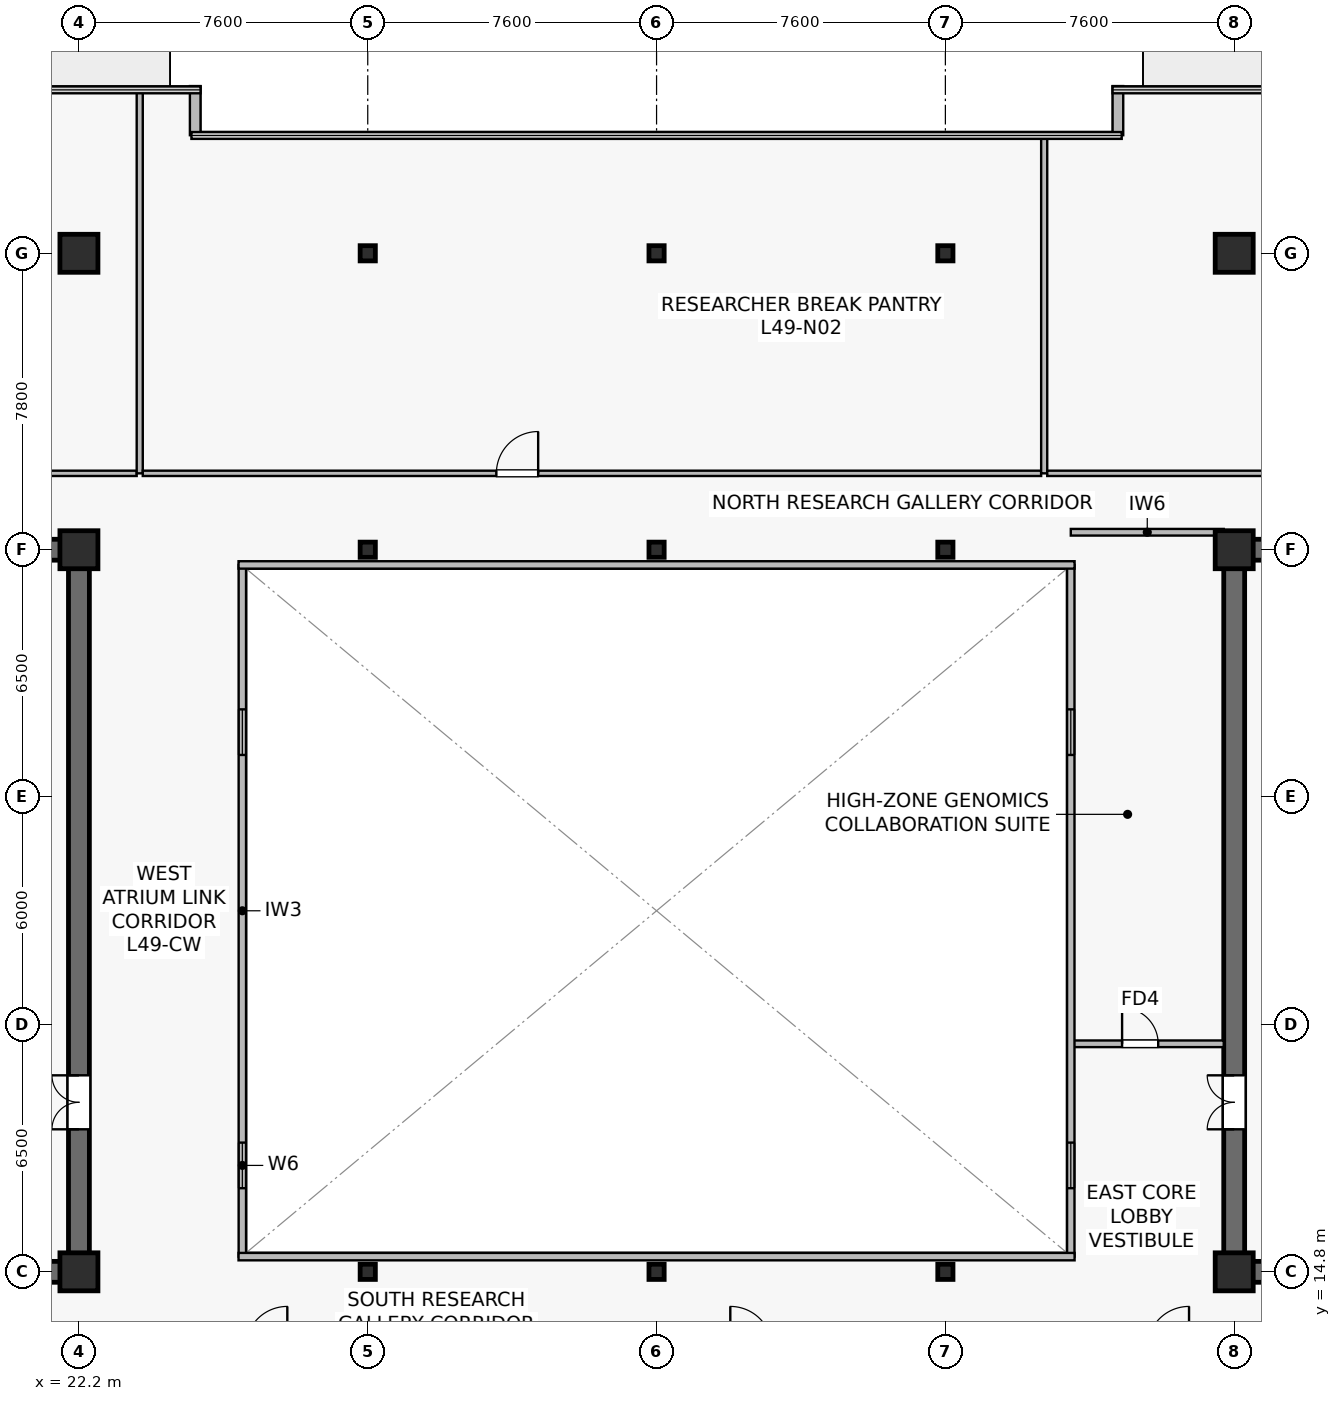
"""IFC4 building model, lengths in metres.
Left out: names, types, materials, properties, quantities, classifications, styles, units other than length and angle.
Written with IfcOpenShell. Run it as: python <this file> out.ifc"""

import sys

from ifc_helpers import new_model, si_unit, direction, frame, frame_2d, origin, origin_2d, place, context, subcontext, project, spatial, rectangle, hollow_rectangle, extrude, source, transform, mapped, element, fill, save


model = new_model("IFC4")
c1 = context("Model", 3, precision=1e-05, world=origin(), true_north=direction((0.0, 1.0)))
c2 = subcontext(c1, "Body", "Model", "MODEL_VIEW")
j1 = project(units=[si_unit("LENGTHUNIT", "METRE"), si_unit("PLANEANGLEUNIT", "RADIAN")], contexts=[c1])
p1 = place(None, origin())
s1 = spatial("IfcSite", under=j1, at=p1, CompositionType="ELEMENT")
p2 = place(p1, origin())
s2 = spatial("IfcBuilding", under=s1, at=p2, CompositionType="ELEMENT")
p3 = place(p2, frame((0.0, 0.0, 205.5)))
s3 = spatial("IfcBuildingStorey", under=s2, at=p3, CompositionType="ELEMENT", Elevation=205.5)
p4 = place(p3, frame((7.125, 14.8, 0.0), z_axis=(0.0, 0.0, 1.0), x_axis=(1.0, 0.0, 0.0)))
e1 = element("IfcWall", 1, at=p4, inside=s3, PredefinedType="SHEAR", context=c2, shape_type="SweptSolid", body=[
    extrude(rectangle(XDim=15.35, YDim=0.55, at=frame_2d((7.675, 0.0))), origin(), (0.0, 0.0, 1.0), 3.8),
])
p5 = place(p3, frame((7.125, 33.8, 0.0), z_axis=(0.0, 0.0, 1.0), x_axis=(1.0, 0.0, 0.0)))
e2 = element("IfcWall", 2, at=p5, inside=s3, PredefinedType="SHEAR", context=c2, shape_type="SweptSolid", body=[
    extrude(rectangle(XDim=15.35, YDim=0.55, at=frame_2d((7.675, 0.0))), origin(), (0.0, 0.0, 1.0), 3.8),
])
p6 = place(p5, frame((5.625, 0.0, 0.0)))
e3 = element("IfcOpeningElement", 3, at=p6, cuts=e2, PredefinedType="OPENING", context=c2, shape_type="SweptSolid", body=[
    extrude(rectangle(XDim=0.95, YDim=2.15, at=frame_2d((0.475, 1.075))), frame((0.0, 0.285, 0.0), z_axis=(0.0, -1.0, 0.0), x_axis=(1.0, 0.0, 0.0)), (0.0, 0.0, 1.0), 0.57),
])
p7 = place(p5, frame((8.99, 0.0, 0.0)))
e4 = element("IfcOpeningElement", 4, at=p7, cuts=e2, PredefinedType="OPENING", context=c2, shape_type="SweptSolid", body=[
    extrude(rectangle(XDim=0.95, YDim=2.15, at=frame_2d((0.475, 1.075))), frame((0.0, 0.285, 0.0), z_axis=(0.0, -1.0, 0.0), x_axis=(1.0, 0.0, 0.0)), (0.0, 0.0, 1.0), 0.57),
])
p8 = place(p5, frame((12.39, 0.0, 0.0)))
e5 = element("IfcOpeningElement", 5, at=p8, cuts=e2, PredefinedType="OPENING", context=c2, shape_type="SweptSolid", body=[
    extrude(rectangle(XDim=0.95, YDim=2.15, at=frame_2d((0.475, 1.075))), frame((0.0, 0.285, 0.0), z_axis=(0.0, -1.0, 0.0), x_axis=(1.0, 0.0, 0.0)), (0.0, 0.0, 1.0), 0.57),
])
p9 = place(p3, frame((22.2, 15.075, 0.0), z_axis=(0.0, 0.0, 1.0), x_axis=(0.0, 1.0, 0.0)))
e6 = element("IfcWall", 6, at=p9, inside=s3, PredefinedType="SHEAR", context=c2, shape_type="SweptSolid", body=[
    extrude(rectangle(XDim=18.45, YDim=0.55, at=frame_2d((9.225, 0.0))), origin(), (0.0, 0.0, 1.0), 3.8),
])
p10 = place(p9, frame((3.475, 0.0, 0.0)))
e7 = element("IfcOpeningElement", 7, at=p10, cuts=e6, PredefinedType="OPENING", context=c2, shape_type="SweptSolid", body=[
    extrude(rectangle(XDim=1.42, YDim=2.2, at=frame_2d((0.71, 1.1))), frame((0.0, 0.285, 0.0), z_axis=(0.0, -1.0, 0.0), x_axis=(1.0, 0.0, 0.0)), (0.0, 0.0, 1.0), 0.57),
])
p11 = place(p3, frame((52.325, 14.8, 0.0), z_axis=(0.0, 0.0, 1.0), x_axis=(1.0, 0.0, 0.0)))
e8 = element("IfcWall", 8, at=p11, inside=s3, PredefinedType="SHEAR", context=c2, shape_type="SweptSolid", body=[
    extrude(rectangle(XDim=15.35, YDim=0.55, at=frame_2d((7.675, 0.0))), origin(), (0.0, 0.0, 1.0), 3.8),
])
p12 = place(p3, frame((52.325, 33.8, 0.0), z_axis=(0.0, 0.0, 1.0), x_axis=(1.0, 0.0, 0.0)))
e9 = element("IfcWall", 9, at=p12, inside=s3, PredefinedType="SHEAR", context=c2, shape_type="SweptSolid", body=[
    extrude(rectangle(XDim=15.35, YDim=0.55, at=frame_2d((7.675, 0.0))), origin(), (0.0, 0.0, 1.0), 3.8),
])
p13 = place(p12, frame((8.775, 0.0, 0.0)))
e10 = element("IfcOpeningElement", 10, at=p13, cuts=e9, PredefinedType="OPENING", context=c2, shape_type="SweptSolid", body=[
    extrude(rectangle(XDim=0.95, YDim=2.15, at=frame_2d((0.475, 1.075))), frame((0.0, 0.285, 0.0), z_axis=(0.0, -1.0, 0.0), x_axis=(1.0, 0.0, 0.0)), (0.0, 0.0, 1.0), 0.57),
])
p14 = place(p12, frame((5.41, 0.0, 0.0)))
e11 = element("IfcOpeningElement", 11, at=p14, cuts=e9, PredefinedType="OPENING", context=c2, shape_type="SweptSolid", body=[
    extrude(rectangle(XDim=0.95, YDim=2.15, at=frame_2d((0.475, 1.075))), frame((0.0, 0.285, 0.0), z_axis=(0.0, -1.0, 0.0), x_axis=(1.0, 0.0, 0.0)), (0.0, 0.0, 1.0), 0.57),
])
p15 = place(p12, frame((2.01, 0.0, 0.0)))
e12 = element("IfcOpeningElement", 12, at=p15, cuts=e9, PredefinedType="OPENING", context=c2, shape_type="SweptSolid", body=[
    extrude(rectangle(XDim=0.95, YDim=2.15, at=frame_2d((0.475, 1.075))), frame((0.0, 0.285, 0.0), z_axis=(0.0, -1.0, 0.0), x_axis=(1.0, 0.0, 0.0)), (0.0, 0.0, 1.0), 0.57),
])
p16 = place(p3, frame((52.6, 15.075, 0.0), z_axis=(0.0, 0.0, 1.0), x_axis=(0.0, 1.0, 0.0)))
e13 = element("IfcWall", 13, at=p16, inside=s3, PredefinedType="SHEAR", context=c2, shape_type="SweptSolid", body=[
    extrude(rectangle(XDim=18.45, YDim=0.55, at=frame_2d((9.225, 0.0))), origin(), (0.0, 0.0, 1.0), 3.8),
])
p17 = place(p16, frame((3.475, 0.0, 0.0)))
e14 = element("IfcOpeningElement", 14, at=p17, cuts=e13, PredefinedType="OPENING", context=c2, shape_type="SweptSolid", body=[
    extrude(rectangle(XDim=1.42, YDim=2.2, at=frame_2d((0.71, 1.1))), frame((0.0, 0.285, 0.0), z_axis=(0.0, -1.0, 0.0), x_axis=(1.0, 0.0, 0.0)), (0.0, 0.0, 1.0), 0.57),
])
m1 = source(origin(), c2, "Body", "SweptSolid", [
    extrude(rectangle(XDim=1.0, YDim=1.0, at=origin_2d()), origin(), (0.0, 0.0, 1.0), 4.1),
])
for number, where, z_axis, x_axis in (
    (15, (22.2, 14.8, 0.0), (0.0, 0.0, 1.0), (1.0, 0.0, 0.0)),
    (16, (22.2, 33.8, 0.0), (0.0, 0.0, 1.0), (1.0, 0.0, 0.0)),
    (17, (22.2, 41.6, 0.0), (0.0, 0.0, 1.0), (1.0, 0.0, 0.0)),
    (18, (52.6, 14.8, 0.0), (0.0, 0.0, 1.0), (1.0, 0.0, 0.0)),
    (19, (52.6, 33.8, 0.0), (0.0, 0.0, 1.0), (1.0, 0.0, 0.0)),
    (20, (52.6, 41.6, 0.0), (0.0, 0.0, 1.0), (1.0, 0.0, 0.0)),
):
    element("IfcColumn", number, at=place(p3, frame(where, z_axis=z_axis, x_axis=x_axis)), inside=s3, PredefinedType="COLUMN", context=c2, shape_type="MappedRepresentation", body=[
        mapped(m1, transform((0.0, 0.0, 0.0), scale=1.0)),
    ])
m2 = source(origin(), c2, "Body", "SweptSolid", [
    extrude(hollow_rectangle(XDim=0.4, YDim=0.4, WallThickness=0.019, at=origin_2d()), origin(), (0.0, 0.0, 1.0), 4.1),
])
for number, where, z_axis, x_axis in (
    (21, (29.8, 14.8, 0.0), (0.0, 0.0, 1.0), (1.0, 0.0, 0.0)),
    (22, (29.8, 33.8, 0.0), (0.0, 0.0, 1.0), (1.0, 0.0, 0.0)),
    (23, (29.8, 41.6, 0.0), (0.0, 0.0, 1.0), (1.0, 0.0, 0.0)),
    (24, (37.4, 14.8, 0.0), (0.0, 0.0, 1.0), (1.0, 0.0, 0.0)),
    (25, (37.4, 33.8, 0.0), (0.0, 0.0, 1.0), (1.0, 0.0, 0.0)),
    (26, (37.4, 41.6, 0.0), (0.0, 0.0, 1.0), (1.0, 0.0, 0.0)),
    (27, (45.0, 14.8, 0.0), (0.0, 0.0, 1.0), (1.0, 0.0, 0.0)),
    (28, (45.0, 33.8, 0.0), (0.0, 0.0, 1.0), (1.0, 0.0, 0.0)),
    (29, (45.0, 41.6, 0.0), (0.0, 0.0, 1.0), (1.0, 0.0, 0.0)),
):
    element("IfcColumn", number, at=place(p3, frame(where, z_axis=z_axis, x_axis=x_axis)), inside=s3, PredefinedType="COLUMN", context=c2, shape_type="MappedRepresentation", body=[
        mapped(m2, transform((0.0, 0.0, 0.0), scale=1.0)),
    ])
for number, where, z_axis, x_axis in (
    (30, (49.54, 46.0, 0.0), (0.0, 0.0, 1.0), (0.0, -1.0, 0.0)),
    (31, (25.26, 44.707, 0.0), (0.0, 0.0, 1.0), (0.0, 1.0, 0.0)),
):
    element("IfcWall", number, at=place(p3, frame(where, z_axis=z_axis, x_axis=x_axis)), inside=s3, PredefinedType="STANDARD", context=c2, shape_type="SweptSolid", body=[
        extrude(rectangle(XDim=1.293, YDim=0.28, at=frame_2d((0.646, 0.0))), origin(), (0.0, 0.0, 1.0), 3.8),
    ])
p18 = place(p3, frame((48.3, 34.26, 0.0), z_axis=(0.0, 0.0, 1.0), x_axis=(1.0, 0.0, 0.0)))
e32 = element("IfcWall", 32, at=p18, inside=s3, PredefinedType="PARTITIONING", context=c2, shape_type="SweptSolid", body=[
    extrude(rectangle(XDim=4.025, YDim=0.175, at=frame_2d((2.012, 0.0))), origin(), (0.0, 0.0, 1.0), 3.485),
])
p19 = place(p3, frame((48.3, 20.8, 0.0), z_axis=(0.0, 0.0, 1.0), x_axis=(1.0, 0.0, 0.0)))
e33 = element("IfcWall", 33, at=p19, inside=s3, PredefinedType="PARTITIONING", context=c2, shape_type="SweptSolid", body=[
    extrude(rectangle(XDim=4.025, YDim=0.175, at=frame_2d((2.012, 0.0))), origin(), (0.0, 0.0, 1.0), 3.8),
])
p20 = place(p19, frame((1.35, 0.0, 0.0)))
e34 = element("IfcOpeningElement", 34, at=p20, cuts=e33, PredefinedType="OPENING", context=c2, shape_type="SweptSolid", body=[
    extrude(rectangle(XDim=0.95, YDim=2.15, at=frame_2d((0.475, 1.075))), frame((0.0, 0.098, 0.0), z_axis=(0.0, -1.0, 0.0), x_axis=(1.0, 0.0, 0.0)), (0.0, 0.0, 1.0), 0.195),
])
p21 = place(p3, frame((26.5, 15.2, 0.0), z_axis=(0.0, 0.0, 1.0), x_axis=(0.0, 1.0, 0.0)))
e35 = element("IfcWall", 35, at=p21, inside=s3, PredefinedType="SOLIDWALL", context=c2, shape_type="SweptSolid", body=[
    extrude(rectangle(XDim=18.2, YDim=0.195, at=frame_2d((9.1, 0.0))), origin(), (0.0, 0.0, 1.0), 3.8),
])
p22 = place(p21, frame((1.8, 0.0, 0.9)))
e36 = element("IfcOpeningElement", 36, at=p22, cuts=e35, PredefinedType="OPENING", context=c2, shape_type="SweptSolid", body=[
    extrude(rectangle(XDim=1.2, YDim=1.35, at=frame_2d((0.6, 0.675))), frame((0.0, 0.107, 0.0), z_axis=(0.0, -1.0, 0.0), x_axis=(1.0, 0.0, 0.0)), (0.0, 0.0, 1.0), 0.215),
])
p23 = place(p21, frame((13.2, 0.0, 0.9)))
e37 = element("IfcOpeningElement", 37, at=p23, cuts=e35, PredefinedType="OPENING", context=c2, shape_type="SweptSolid", body=[
    extrude(rectangle(XDim=1.2, YDim=1.35, at=frame_2d((0.6, 0.675))), frame((0.0, 0.107, 0.0), z_axis=(0.0, -1.0, 0.0), x_axis=(1.0, 0.0, 0.0)), (0.0, 0.0, 1.0), 0.215),
])
p24 = place(p3, frame((48.3, 15.2, 0.0), z_axis=(0.0, 0.0, 1.0), x_axis=(0.0, 1.0, 0.0)))
e38 = element("IfcWall", 38, at=p24, inside=s3, PredefinedType="SOLIDWALL", context=c2, shape_type="SweptSolid", body=[
    extrude(rectangle(XDim=18.2, YDim=0.195, at=frame_2d((9.1, 0.0))), origin(), (0.0, 0.0, 1.0), 3.8),
])
p25 = place(p24, frame((1.8, 0.0, 0.9)))
e39 = element("IfcOpeningElement", 39, at=p25, cuts=e38, PredefinedType="OPENING", context=c2, shape_type="SweptSolid", body=[
    extrude(rectangle(XDim=1.2, YDim=1.35, at=frame_2d((0.6, 0.675))), frame((0.0, 0.107, 0.0), z_axis=(0.0, -1.0, 0.0), x_axis=(1.0, 0.0, 0.0)), (0.0, 0.0, 1.0), 0.215),
])
p26 = place(p24, frame((13.2, 0.0, 0.9)))
e40 = element("IfcOpeningElement", 40, at=p26, cuts=e38, PredefinedType="OPENING", context=c2, shape_type="SweptSolid", body=[
    extrude(rectangle(XDim=1.2, YDim=1.35, at=frame_2d((0.6, 0.675))), frame((0.0, 0.107, 0.0), z_axis=(0.0, -1.0, 0.0), x_axis=(1.0, 0.0, 0.0)), (0.0, 0.0, 1.0), 0.215),
])
for number, where, z_axis, x_axis in (
    (41, (26.4, 15.2, 0.0), (0.0, 0.0, 1.0), (1.0, 0.0, 0.0)),
    (42, (26.4, 33.4, 0.0), (0.0, 0.0, 1.0), (1.0, 0.0, 0.0)),
):
    element("IfcWall", number, at=place(p3, frame(where, z_axis=z_axis, x_axis=x_axis)), inside=s3, PredefinedType="SOLIDWALL", context=c2, shape_type="SweptSolid", body=[
        extrude(rectangle(XDim=22.0, YDim=0.195, at=frame_2d((11.0, 0.0))), origin(), (0.0, 0.0, 1.0), 3.8),
    ])
p27 = place(p3, frame((7.31, 35.81, 0.0), z_axis=(0.0, 0.0, 1.0), x_axis=(1.0, 0.0, 0.0)))
e43 = element("IfcWall", 43, at=p27, inside=s3, PredefinedType="PARTITIONING", context=c2, shape_type="SweptSolid", body=[
    extrude(rectangle(XDim=16.41, YDim=0.14, at=frame_2d((8.205, 0.0))), origin(), (0.0, 0.0, 1.0), 3.197),
])
p28 = place(p27, frame((8.093, 0.0, 0.0)))
e44 = element("IfcOpeningElement", 44, at=p28, cuts=e43, PredefinedType="OPENING", context=c2, shape_type="SweptSolid", body=[
    extrude(rectangle(XDim=1.1, YDim=2.18, at=frame_2d((0.55, 1.09))), frame((0.0, 0.08, 0.0), z_axis=(0.0, -1.0, 0.0), x_axis=(1.0, 0.0, 0.0)), (0.0, 0.0, 1.0), 0.16),
])
p29 = place(p3, frame((23.8, 35.81, 0.0), z_axis=(0.0, 0.0, 1.0), x_axis=(0.0, 1.0, 0.0)))
e45 = element("IfcWall", 45, at=p29, inside=s3, PredefinedType="PARTITIONING", context=c2, shape_type="SweptSolid", body=[
    extrude(rectangle(XDim=10.08, YDim=0.16, at=frame_2d((5.04, 0.0))), origin(), (0.0, 0.0, 1.0), 3.135),
])
p30 = place(p3, frame((23.88, 35.81, 0.0), z_axis=(0.0, 0.0, 1.0), x_axis=(1.0, 0.0, 0.0)))
e46 = element("IfcWall", 46, at=p30, inside=s3, PredefinedType="PARTITIONING", context=c2, shape_type="SweptSolid", body=[
    extrude(rectangle(XDim=23.64, YDim=0.14, at=frame_2d((11.82, 0.0))), origin(), (0.0, 0.0, 1.0), 3.197),
])
p31 = place(p30, frame((9.304, 0.0, 0.0)))
e47 = element("IfcOpeningElement", 47, at=p31, cuts=e46, PredefinedType="OPENING", context=c2, shape_type="SweptSolid", body=[
    extrude(rectangle(XDim=1.1, YDim=2.18, at=frame_2d((0.55, 1.09))), frame((0.0, 0.08, 0.0), z_axis=(0.0, -1.0, 0.0), x_axis=(1.0, 0.0, 0.0)), (0.0, 0.0, 1.0), 0.16),
])
p32 = place(p3, frame((47.6, 35.81, 0.0), z_axis=(0.0, 0.0, 1.0), x_axis=(0.0, 1.0, 0.0)))
e48 = element("IfcWall", 48, at=p32, inside=s3, PredefinedType="PARTITIONING", context=c2, shape_type="SweptSolid", body=[
    extrude(rectangle(XDim=8.88, YDim=0.16, at=frame_2d((4.44, 0.0))), origin(), (0.0, 0.0, 1.0), 3.135),
])
p33 = place(p3, frame((47.68, 35.81, 0.0), z_axis=(0.0, 0.0, 1.0), x_axis=(1.0, 0.0, 0.0)))
e49 = element("IfcWall", 49, at=p33, inside=s3, PredefinedType="PARTITIONING", context=c2, shape_type="SweptSolid", body=[
    extrude(rectangle(XDim=19.81, YDim=0.14, at=frame_2d((9.905, 0.0))), origin(), (0.0, 0.0, 1.0), 3.197),
])
p34 = place(p33, frame((9.895, 0.0, 0.0)))
e50 = element("IfcOpeningElement", 50, at=p34, cuts=e49, PredefinedType="OPENING", context=c2, shape_type="SweptSolid", body=[
    extrude(rectangle(XDim=1.1, YDim=2.18, at=frame_2d((0.55, 1.09))), frame((0.0, 0.08, 0.0), z_axis=(0.0, -1.0, 0.0), x_axis=(1.0, 0.0, 0.0)), (0.0, 0.0, 1.0), 0.16),
])
m3 = source(origin(), c2, "Body", "SweptSolid", [
    extrude(rectangle(XDim=1.2, YDim=1.35, at=frame_2d((0.6, 0.675))), frame((0.0, 0.03, 0.0), z_axis=(0.0, -1.0, 0.0), x_axis=(1.0, 0.0, 0.0)), (0.0, 0.0, 1.0), 0.06),
])
p35 = place(p22, origin())
e51 = element("IfcWindow", 51, at=p35, inside=s3, PartitioningType="SINGLE_PANEL", PredefinedType="WINDOW", context=c2, shape_type="MappedRepresentation", body=[
    mapped(m3, transform((0.0, 0.0, 0.0), scale=1.0)),
])
fill(e36, e51)
p36 = place(p23, origin())
e52 = element("IfcWindow", 52, at=p36, inside=s3, PartitioningType="SINGLE_PANEL", PredefinedType="WINDOW", context=c2, shape_type="MappedRepresentation", body=[
    mapped(m3, transform((0.0, 0.0, 0.0), scale=1.0)),
])
fill(e37, e52)
p37 = place(p25, origin())
e53 = element("IfcWindow", 53, at=p37, inside=s3, PartitioningType="SINGLE_PANEL", PredefinedType="WINDOW", context=c2, shape_type="MappedRepresentation", body=[
    mapped(m3, transform((0.0, 0.0, 0.0), scale=1.0)),
])
fill(e39, e53)
p38 = place(p26, origin())
e54 = element("IfcWindow", 54, at=p38, inside=s3, PartitioningType="SINGLE_PANEL", PredefinedType="WINDOW", context=c2, shape_type="MappedRepresentation", body=[
    mapped(m3, transform((0.0, 0.0, 0.0), scale=1.0)),
])
fill(e40, e54)
m4 = source(origin(), c2, "Body", "SweptSolid", [
    extrude(rectangle(XDim=1.42, YDim=2.2, at=frame_2d((0.71, 1.1))), frame((0.0, 0.025, 0.0), z_axis=(0.0, -1.0, 0.0), x_axis=(1.0, 0.0, 0.0)), (0.0, 0.0, 1.0), 0.05),
])
p39 = place(p10, origin())
e55 = element("IfcDoor", 55, at=p39, inside=s3, OperationType="DOUBLE_DOOR_SINGLE_SWING", PredefinedType="DOOR", context=c2, shape_type="MappedRepresentation", body=[
    mapped(m4, transform((0.0, 0.0, 0.0), scale=1.0)),
])
fill(e7, e55)
p40 = place(p17, origin())
e56 = element("IfcDoor", 56, at=p40, inside=s3, OperationType="DOUBLE_DOOR_SINGLE_SWING", PredefinedType="DOOR", context=c2, shape_type="MappedRepresentation", body=[
    mapped(m4, transform((0.0, 0.0, 0.0), scale=1.0)),
])
fill(e14, e56)
m5 = source(origin(), c2, "Body", "SweptSolid", [
    extrude(rectangle(XDim=0.95, YDim=2.15, at=frame_2d((0.475, 1.075))), frame((0.0, 0.025, 0.0), z_axis=(0.0, -1.0, 0.0), x_axis=(1.0, 0.0, 0.0)), (0.0, 0.0, 1.0), 0.05),
])
p41 = place(p20, origin())
e57 = element("IfcDoor", 57, at=p41, inside=s3, OperationType="SINGLE_SWING_LEFT", PredefinedType="DOOR", context=c2, shape_type="MappedRepresentation", body=[
    mapped(m5, transform((0.0, 0.0, 0.0), scale=1.0)),
])
fill(e34, e57)
m6 = source(origin(), c2, "Body", "SweptSolid", [
    extrude(rectangle(XDim=1.1, YDim=2.18, at=frame_2d((0.55, 1.09))), frame((0.0, 0.025, 0.0), z_axis=(0.0, -1.0, 0.0), x_axis=(1.0, 0.0, 0.0)), (0.0, 0.0, 1.0), 0.05),
])
p42 = place(p31, origin())
e58 = element("IfcDoor", 58, at=p42, inside=s3, OperationType="SINGLE_SWING_RIGHT", PredefinedType="DOOR", context=c2, shape_type="MappedRepresentation", body=[
    mapped(m6, transform((0.0, 0.0, 0.0), scale=1.0)),
])
fill(e47, e58)
save(model, sys.argv[1])
